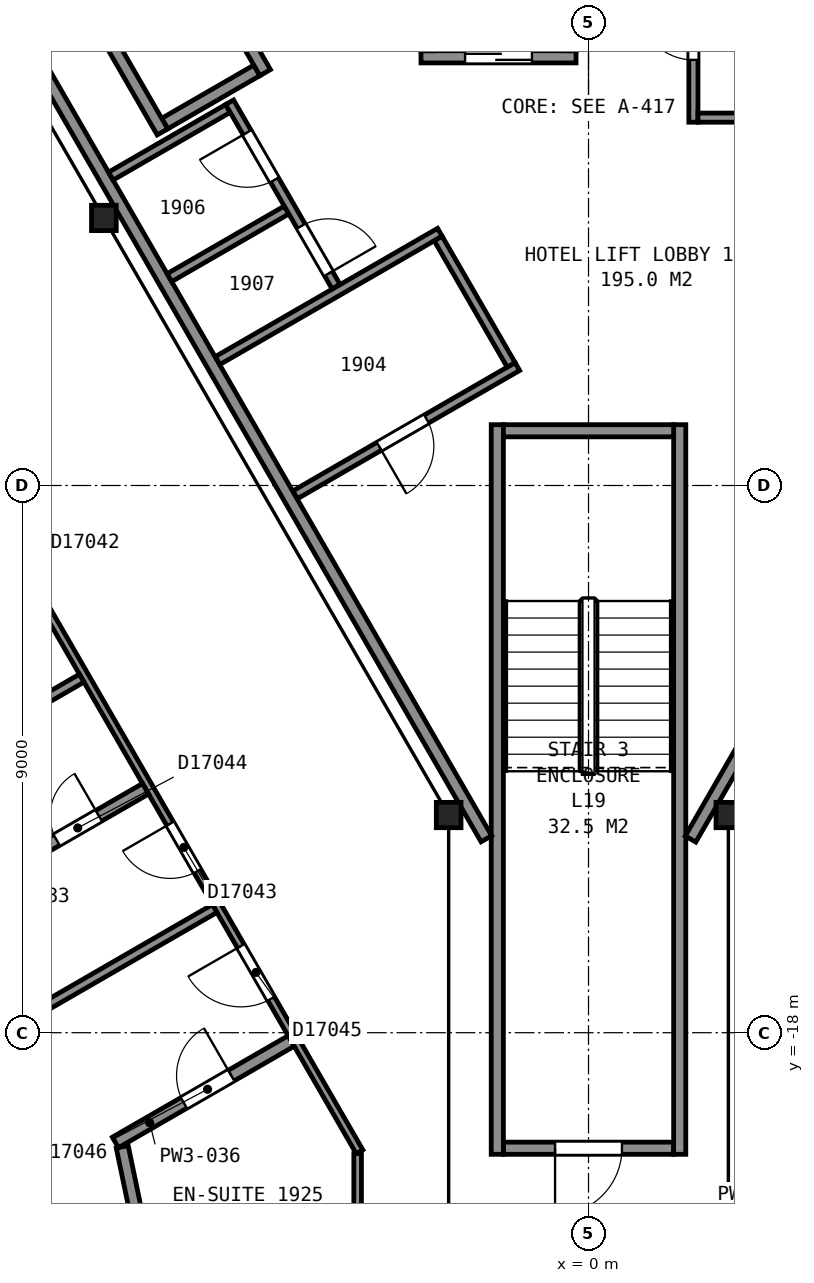
"""IFC4 building model, lengths in metres.
Left out: names, types, materials, properties, quantities, classifications, styles, units other than length and angle.
Written with IfcOpenShell. Run it as: python <this file> out.ifc"""

import sys

from ifc_helpers import new_model, si_unit, direction, frame, frame_2d, origin, origin_2d, place, context, subcontext, project, spatial, rectangle, i_section, extrude, element, fill, save


model = new_model("IFC4")
c1 = context("Model", 3, precision=1e-05, world=origin(), true_north=direction((0.0, 1.0)))
c2 = subcontext(c1, "Body", "Model", "MODEL_VIEW")
j1 = project(units=[si_unit("LENGTHUNIT", "METRE"), si_unit("PLANEANGLEUNIT", "RADIAN")], contexts=[c1])
p1 = place(None, origin())
s1 = spatial("IfcSite", under=j1, at=p1, CompositionType="ELEMENT")
p2 = place(p1, origin())
s2 = spatial("IfcBuilding", under=s1, at=p2, CompositionType="ELEMENT")
p3 = place(p2, frame((0.0, 0.0, 83.6)))
s3 = spatial("IfcBuildingStorey", under=s2, at=p3, CompositionType="ELEMENT", Elevation=83.6)
for number, where, z_axis, x_axis in (
    (1, (-7.97, -4.6, 0.0), (0.0, 0.0, 1.0), (1.0, 0.0, 0.0)),
    (2, (-2.3, -14.42, 0.0), (0.0, 0.0, 1.0), (1.0, 0.0, 0.0)),
    (3, (2.3, -14.42, 0.0), (0.0, 0.0, 1.0), (1.0, 0.0, 0.0)),
):
    element("IfcColumn", number, at=place(p3, frame(where, z_axis=z_axis, x_axis=x_axis)), inside=s3, PredefinedType="COLUMN", context=c2, shape_type="SweptSolid", body=[
        extrude(i_section(OverallWidth=0.406, OverallDepth=0.417, WebThickness=0.03, FlangeThickness=0.048, FilletRadius=0.015, at=origin_2d()), origin(), (0.0, 0.0, 1.0), 3.6),
    ])
p4 = place(p3, frame((-1.4, -19.9, 0.0), z_axis=(0.0, 0.0, 1.0), x_axis=(1.0, 0.0, 0.0)))
e4 = element("IfcWall", 4, at=p4, inside=s3, PredefinedType="PARTITIONING", context=c2, shape_type="SweptSolid", body=[
    extrude(rectangle(XDim=2.8, YDim=0.2, at=frame_2d((1.4, 0.0))), origin(), (0.0, 0.0, 1.0), 3.35),
])
p5 = place(p4, frame((0.85, 0.0, 0.0)))
e5 = element("IfcOpeningElement", 5, at=p5, cuts=e4, PredefinedType="OPENING", context=c2, shape_type="SweptSolid", body=[
    extrude(rectangle(XDim=1.1, YDim=2.1, at=frame_2d((0.55, 1.05))), frame((0.0, 0.11, 0.0), z_axis=(0.0, -1.0, 0.0), x_axis=(1.0, 0.0, 0.0)), (0.0, 0.0, 1.0), 0.22),
])
for number, where, z_axis, x_axis in (
    (6, (1.5, -8.0, 0.0), (0.0, 0.0, 1.0), (0.0, -1.0, 0.0)),
    (7, (-1.5, -8.0, 0.0), (0.0, 0.0, 1.0), (0.0, -1.0, 0.0)),
):
    element("IfcWall", number, at=place(p3, frame(where, z_axis=z_axis, x_axis=x_axis)), inside=s3, PredefinedType="PARTITIONING", context=c2, shape_type="SweptSolid", body=[
        extrude(rectangle(XDim=12.0, YDim=0.2, at=frame_2d((6.0, 0.0))), origin(), (0.0, 0.0, 1.0), 3.35),
    ])
p6 = place(p3, frame((-1.4, -8.1, 0.0), z_axis=(0.0, 0.0, 1.0), x_axis=(1.0, 0.0, 0.0)))
e8 = element("IfcWall", 8, at=p6, inside=s3, PredefinedType="PARTITIONING", context=c2, shape_type="SweptSolid", body=[
    extrude(rectangle(XDim=2.8, YDim=0.2, at=frame_2d((1.4, 0.0))), origin(), (0.0, 0.0, 1.0), 3.35),
])
p7 = place(p3, frame((-2.755, -1.95, 0.0), z_axis=(0.0, 0.0, 1.0), x_axis=(1.0, 0.0, 0.0)))
e9 = element("IfcWall", 9, at=p7, inside=s3, PredefinedType="PARTITIONING", context=c2, shape_type="SweptSolid", body=[
    extrude(rectangle(XDim=2.55, YDim=0.2, at=frame_2d((1.275, 0.0))), origin(), (0.0, 0.0, 1.0), 3.6),
])
p8 = place(p7, frame((0.725, 0.0, 0.0)))
e10 = element("IfcOpeningElement", 10, at=p8, cuts=e9, PredefinedType="OPENING", context=c2, shape_type="SweptSolid", body=[
    extrude(rectangle(XDim=1.1, YDim=2.1, at=frame_2d((0.55, 1.05))), frame((0.0, 0.11, 0.0), z_axis=(0.0, -1.0, 0.0), x_axis=(1.0, 0.0, 0.0)), (0.0, 0.0, 1.0), 0.22),
])
p9 = place(p3, frame((-6.97, -3.048, 0.0), z_axis=(0.0, 0.0, 1.0), x_axis=(0.866036909293, 0.499980071345, 0.0)))
e11 = element("IfcWall", 11, at=p9, inside=s3, PredefinedType="PARTITIONING", context=c2, shape_type="SweptSolid", body=[
    extrude(rectangle(XDim=1.75, YDim=0.2, at=frame_2d((0.875, 0.0))), origin(), (0.0, 0.0, 1.0), 3.6),
])
p10 = place(p3, frame((-5.318, -2.21, 0.0), z_axis=(0.0, 0.0, 1.0), x_axis=(-0.499938297808, 0.866061024631, 0.0)))
e12 = element("IfcWall", 12, at=p10, inside=s3, PredefinedType="PARTITIONING", context=c2, shape_type="SweptSolid", body=[
    extrude(rectangle(XDim=2.35, YDim=0.2, at=frame_2d((1.175, 0.0))), origin(), (0.0, 0.0, 1.0), 3.6),
])
p11 = place(p3, frame((-7.006, -3.185, 0.0), z_axis=(0.0, 0.0, 1.0), x_axis=(-0.499990435942, 0.866030925526, 0.0)))
e13 = element("IfcWall", 13, at=p11, inside=s3, PredefinedType="PARTITIONING", context=c2, shape_type="SweptSolid", body=[
    extrude(rectangle(XDim=2.55, YDim=0.2, at=frame_2d((1.275, 0.0))), origin(), (0.0, 0.0, 1.0), 3.6),
])
p12 = place(p3, frame((-13.664, 5.946, 0.0), z_axis=(0.0, 0.0, 1.0), x_axis=(0.499994327219, -0.866028678941, 0.0)))
e14 = element("IfcWall", 14, at=p12, inside=s3, PredefinedType="PARTITIONING", context=c2, shape_type="SweptSolid", body=[
    extrude(rectangle(XDim=23.968, YDim=0.2, at=frame_2d((11.984, 0.0))), origin(), (0.0, 0.0, 1.0), 3.35),
])
p13 = place(p3, frame((-7.856, -3.912, 0.0), z_axis=(0.0, 0.0, 1.0), x_axis=(0.865971748, 0.500092923031, 0.0)))
e15 = element("IfcWall", 15, at=p13, inside=s3, PredefinedType="PARTITIONING", context=c2, shape_type="SweptSolid", body=[
    extrude(rectangle(XDim=2.225, YDim=0.15, at=frame_2d((1.112, 0.0))), origin(), (0.0, 0.0, 1.0), 3.35),
])
p14 = place(p3, frame((-6.892, -5.582, 0.0), z_axis=(0.0, 0.0, 1.0), x_axis=(0.865944298464, 0.500140452231, 0.0)))
e16 = element("IfcWall", 16, at=p14, inside=s3, PredefinedType="PARTITIONING", context=c2, shape_type="SweptSolid", body=[
    extrude(rectangle(XDim=2.224, YDim=0.15, at=frame_2d((1.112, 0.0))), origin(), (0.0, 0.0, 1.0), 3.35),
])
p15 = place(p3, frame((-6.1, -6.946, 0.0), z_axis=(0.0, 0.0, 1.0), x_axis=(0.866038200431, 0.499977834903, 0.0)))
e17 = element("IfcWall", 17, at=p15, inside=s3, PredefinedType="PARTITIONING", context=c2, shape_type="SweptSolid", body=[
    extrude(rectangle(XDim=4.22, YDim=0.15, at=frame_2d((2.11, 0.0))), origin(), (0.0, 0.0, 1.0), 3.35),
])
p16 = place(p3, frame((-4.152, -5.729, 0.0), z_axis=(0.0, 0.0, 1.0), x_axis=(-0.500024287448, 0.866011380966, 0.0)))
e18 = element("IfcWall", 18, at=p16, inside=s3, PredefinedType="PARTITIONING", context=c2, shape_type="SweptSolid", body=[
    extrude(rectangle(XDim=3.501, YDim=0.15, at=frame_2d((1.75, 0.0))), origin(), (0.0, 0.0, 1.0), 3.35),
])
p17 = place(p16, frame((2.026, 0.0, 0.0)))
e19 = element("IfcOpeningElement", 19, at=p17, cuts=e18, PredefinedType="OPENING", context=c2, shape_type="SweptSolid", body=[
    extrude(rectangle(XDim=0.9, YDim=2.1, at=frame_2d((0.45, 1.05))), frame((0.0, 0.085, 0.0), z_axis=(0.0, -1.0, 0.0), x_axis=(1.0, 0.0, 0.0)), (0.0, 0.0, 1.0), 0.17),
])
p18 = place(p16, frame((0.248, 0.0, 0.0)))
e20 = element("IfcOpeningElement", 20, at=p18, cuts=e18, PredefinedType="OPENING", context=c2, shape_type="SweptSolid", body=[
    extrude(rectangle(XDim=0.9, YDim=2.1, at=frame_2d((0.45, 1.05))), frame((0.0, 0.085, 0.0), z_axis=(0.0, -1.0, 0.0), x_axis=(1.0, 0.0, 0.0)), (0.0, 0.0, 1.0), 0.17),
])
p19 = place(p3, frame((-4.825, -9.154, 0.0), z_axis=(0.0, 0.0, 1.0), x_axis=(0.866023738697, 0.500002884005, 0.0)))
e21 = element("IfcWall", 21, at=p19, inside=s3, PredefinedType="PARTITIONING", context=c2, shape_type="SweptSolid", body=[
    extrude(rectangle(XDim=4.22, YDim=0.15, at=frame_2d((2.11, 0.0))), origin(), (0.0, 0.0, 1.0), 3.35),
])
p20 = place(p19, frame((1.595, 0.0, 0.0)))
e22 = element("IfcOpeningElement", 22, at=p20, cuts=e21, PredefinedType="OPENING", context=c2, shape_type="SweptSolid", body=[
    extrude(rectangle(XDim=0.9, YDim=2.1, at=frame_2d((0.45, 1.05))), frame((0.0, 0.085, 0.0), z_axis=(0.0, -1.0, 0.0), x_axis=(1.0, 0.0, 0.0)), (0.0, 0.0, 1.0), 0.17),
])
p21 = place(p3, frame((-2.472, -4.938, 0.0), z_axis=(0.0, 0.0, 1.0), x_axis=(0.500045362686, -0.865999212041, 0.0)))
e23 = element("IfcWall", 23, at=p21, inside=s3, PredefinedType="PARTITIONING", context=c2, shape_type="SweptSolid", body=[
    extrude(rectangle(XDim=2.4, YDim=0.15, at=frame_2d((1.2, 0.0))), origin(), (0.0, 0.0, 1.0), 3.35),
])
p22 = place(p3, frame((1.677, -14.815, 0.0), z_axis=(0.0, 0.0, 1.0), x_axis=(0.49999445743, 0.866028603765, 0.0)))
e24 = element("IfcWall", 24, at=p22, inside=s3, PredefinedType="PARTITIONING", context=c2, shape_type="SweptSolid", body=[
    extrude(rectangle(XDim=5.905, YDim=0.2, at=frame_2d((2.952, 0.0))), origin(), (0.0, 0.0, 1.0), 3.35),
])
p23 = place(p22, frame((3.855, 0.0, 0.0)))
e25 = element("IfcOpeningElement", 25, at=p23, cuts=e24, PredefinedType="OPENING", context=c2, shape_type="SweptSolid", body=[
    extrude(rectangle(XDim=1.8, YDim=2.1, at=frame_2d((0.9, 1.05))), frame((0.0, 0.11, 0.0), z_axis=(0.0, -1.0, 0.0), x_axis=(1.0, 0.0, 0.0)), (0.0, 0.0, 1.0), 0.22),
])
p24 = place(p3, frame((1.725, -0.102, 0.0), z_axis=(0.0, 0.0, 1.0), x_axis=(0.0, -1.0, 0.0)))
e26 = element("IfcWall", 26, at=p24, inside=s3, PredefinedType="PARTITIONING", context=c2, shape_type="SweptSolid", body=[
    extrude(rectangle(XDim=2.923, YDim=0.15, at=frame_2d((1.461, 0.0))), origin(), (0.0, 0.0, 1.0), 3.35),
])
p25 = place(p24, frame((0.998, 0.0, 0.0)))
e27 = element("IfcOpeningElement", 27, at=p25, cuts=e26, PredefinedType="OPENING", context=c2, shape_type="SweptSolid", body=[
    extrude(rectangle(XDim=0.9, YDim=2.1, at=frame_2d((0.45, 1.05))), frame((0.0, 0.085, 0.0), z_axis=(0.0, -1.0, 0.0), x_axis=(1.0, 0.0, 0.0)), (0.0, 0.0, 1.0), 0.17),
])
p26 = place(p3, frame((1.8, -2.95, 0.0), z_axis=(0.0, 0.0, 1.0), x_axis=(1.0, 0.0, 0.0)))
e28 = element("IfcWall", 28, at=p26, inside=s3, PredefinedType="PARTITIONING", context=c2, shape_type="SweptSolid", body=[
    extrude(rectangle(XDim=2.4, YDim=0.15, at=frame_2d((1.2, 0.0))), origin(), (0.0, 0.0, 1.0), 3.35),
])
p27 = place(p3, frame((-3.766, -19.958, 0.0), z_axis=(0.0, 0.0, 1.0), x_axis=(-0.50002170027, 0.866012874765, 0.0)))
e29 = element("IfcWall", 29, at=p27, inside=s3, PredefinedType="PARTITIONING", context=c2, shape_type="SweptSolid", body=[
    extrude(rectangle(XDim=31.379, YDim=0.125, at=frame_2d((15.69, 0.0))), origin(), (0.0, 0.0, 1.0), 2.262),
])
p28 = place(p27, frame((25.28, 0.0, 0.0)))
e30 = element("IfcOpeningElement", 30, at=p28, cuts=e29, PredefinedType="OPENING", context=c2, shape_type="SweptSolid", body=[
    extrude(rectangle(XDim=1.5, YDim=2.1, at=frame_2d((0.75, 1.05))), frame((0.0, 0.073, 0.0), z_axis=(0.0, -1.0, 0.0), x_axis=(1.0, 0.0, 0.0)), (0.0, 0.0, 1.0), 0.145),
])
p29 = place(p27, frame((21.124, 0.0, 0.0)))
e31 = element("IfcOpeningElement", 31, at=p29, cuts=e29, PredefinedType="OPENING", context=c2, shape_type="SweptSolid", body=[
    extrude(rectangle(XDim=0.9, YDim=2.1, at=frame_2d((0.45, 1.05))), frame((0.0, 0.073, 0.0), z_axis=(0.0, -1.0, 0.0), x_axis=(1.0, 0.0, 0.0)), (0.0, 0.0, 1.0), 0.145),
])
p30 = place(p27, frame((14.349, 0.0, 0.0)))
e32 = element("IfcOpeningElement", 32, at=p30, cuts=e29, PredefinedType="OPENING", context=c2, shape_type="SweptSolid", body=[
    extrude(rectangle(XDim=0.9, YDim=2.1, at=frame_2d((0.45, 1.05))), frame((0.0, 0.073, 0.0), z_axis=(0.0, -1.0, 0.0), x_axis=(1.0, 0.0, 0.0)), (0.0, 0.0, 1.0), 0.145),
])
p31 = place(p27, frame((11.804, 0.0, 0.0)))
e33 = element("IfcOpeningElement", 33, at=p31, cuts=e29, PredefinedType="OPENING", context=c2, shape_type="SweptSolid", body=[
    extrude(rectangle(XDim=0.9, YDim=2.1, at=frame_2d((0.45, 1.05))), frame((0.0, 0.073, 0.0), z_axis=(0.0, -1.0, 0.0), x_axis=(1.0, 0.0, 0.0)), (0.0, 0.0, 1.0), 0.145),
])
p32 = place(p27, frame((5.33, 0.0, 0.0)))
e34 = element("IfcOpeningElement", 34, at=p32, cuts=e29, PredefinedType="OPENING", context=c2, shape_type="SweptSolid", body=[
    extrude(rectangle(XDim=0.9, YDim=2.1, at=frame_2d((0.45, 1.05))), frame((0.0, 0.073, 0.0), z_axis=(0.0, -1.0, 0.0), x_axis=(1.0, 0.0, 0.0)), (0.0, 0.0, 1.0), 0.145),
])
p33 = place(p27, frame((2.906, 0.0, 0.0)))
e35 = element("IfcOpeningElement", 35, at=p33, cuts=e29, PredefinedType="OPENING", context=c2, shape_type="SweptSolid", body=[
    extrude(rectangle(XDim=1.0, YDim=2.1, at=frame_2d((0.5, 1.05))), frame((0.0, 0.073, 0.0), z_axis=(0.0, -1.0, 0.0), x_axis=(1.0, 0.0, 0.0)), (0.0, 0.0, 1.0), 0.145),
])
for number, where, z_axis, x_axis in (
    (36, (-15.256, -16.165, 0.0), (0.0, 0.0, 1.0), (0.866, 0.5, 0.0)),
    (37, (-13.069, -19.953, 0.0), (0.0, 0.0, 1.0), (0.866, 0.5, 0.0)),
):
    element("IfcWall", number, at=place(p3, frame(where, z_axis=z_axis, x_axis=x_axis)), inside=s3, PredefinedType="PARTITIONING", context=c2, shape_type="SweptSolid", body=[
        extrude(rectangle(XDim=7.992, YDim=0.15, at=frame_2d((3.996, 0.0))), origin(), (0.0, 0.0, 1.0), 2.262),
    ])
p34 = place(p3, frame((-9.656, -15.357, 0.0), z_axis=(0.0, 0.0, 1.0), x_axis=(0.866005850709, 0.50003386539, 0.0)))
e38 = element("IfcWall", 38, at=p34, inside=s3, PredefinedType="PARTITIONING", context=c2, shape_type="SweptSolid", body=[
    extrude(rectangle(XDim=2.737, YDim=0.2, at=frame_2d((1.369, 0.0))), origin(), (0.0, 0.0, 1.0), 2.262),
])
p35 = place(p34, frame((1.05, 0.0, 0.0)))
e39 = element("IfcOpeningElement", 39, at=p35, cuts=e38, PredefinedType="OPENING", context=c2, shape_type="SweptSolid", body=[
    extrude(rectangle(XDim=0.8, YDim=2.1, at=frame_2d((0.4, 1.05))), frame((0.0, 0.11, 0.0), z_axis=(0.0, -1.0, 0.0), x_axis=(1.0, 0.0, 0.0)), (0.0, 0.0, 1.0), 0.22),
])
p36 = place(p3, frame((-7.668, -19.877, 0.0), z_axis=(0.0, 0.0, 1.0), x_axis=(0.204611748063, -0.978843211426, 0.0)))
e40 = element("IfcWall", 40, at=p36, inside=s3, PredefinedType="PARTITIONING", context=c2, shape_type="SweptSolid", body=[
    extrude(rectangle(XDim=2.921, YDim=0.2, at=frame_2d((1.46, 0.0))), origin(), (0.0, 0.0, 1.0), 2.262),
])
p37 = place(p3, frame((-4.89, -18.136, 0.0), z_axis=(0.0, 0.0, 1.0), x_axis=(-0.866033317326, -0.499986293093, 0.0)))
e41 = element("IfcWall", 41, at=p37, inside=s3, PredefinedType="PARTITIONING", context=c2, shape_type="SweptSolid", body=[
    extrude(rectangle(XDim=3.337, YDim=0.2, at=frame_2d((1.669, 0.0))), origin(), (0.0, 0.0, 1.0), 2.262),
])
p38 = place(p37, frame((1.138, 0.0, 0.0)))
e42 = element("IfcOpeningElement", 42, at=p38, cuts=e41, PredefinedType="OPENING", context=c2, shape_type="SweptSolid", body=[
    extrude(rectangle(XDim=0.9, YDim=2.1, at=frame_2d((0.45, 1.05))), frame((0.0, 0.11, 0.0), z_axis=(0.0, -1.0, 0.0), x_axis=(1.0, 0.0, 0.0)), (0.0, 0.0, 1.0), 0.22),
])
p39 = place(p3, frame((-3.797, -22.86, 0.0), z_axis=(0.0, 0.0, 1.0), x_axis=(0.0, 1.0, 0.0)))
e43 = element("IfcWall", 43, at=p39, inside=s3, PredefinedType="PARTITIONING", context=c2, shape_type="SweptSolid", body=[
    extrude(rectangle(XDim=2.871, YDim=0.125, at=frame_2d((1.435, 0.0))), origin(), (0.0, 0.0, 1.0), 2.262),
])
p40 = place(p5, origin())
e44 = element("IfcDoor", 44, at=p40, inside=s3, OperationType="SINGLE_SWING_LEFT", PredefinedType="DOOR", context=c2, shape_type="SweptSolid", body=[
    extrude(rectangle(XDim=1.1, YDim=2.1, at=frame_2d((0.55, 1.05))), frame((0.0, 0.025, 0.0), z_axis=(0.0, -1.0, 0.0), x_axis=(1.0, 0.0, 0.0)), (0.0, 0.0, 1.0), 0.05),
])
fill(e5, e44)
p41 = place(p8, origin())
e45 = element("IfcDoor", 45, at=p41, inside=s3, OperationType="SLIDING_TO_RIGHT", PredefinedType="DOOR", context=c2, shape_type="SweptSolid", body=[
    extrude(rectangle(XDim=1.1, YDim=2.1, at=frame_2d((0.55, 1.05))), frame((0.0, 0.025, 0.0), z_axis=(0.0, -1.0, 0.0), x_axis=(1.0, 0.0, 0.0)), (0.0, 0.0, 1.0), 0.05),
])
fill(e10, e45)
p42 = place(p17, origin())
e46 = element("IfcDoor", 46, at=p42, inside=s3, OperationType="SINGLE_SWING_RIGHT", PredefinedType="DOOR", context=c2, shape_type="SweptSolid", body=[
    extrude(rectangle(XDim=0.9, YDim=2.1, at=frame_2d((0.45, 1.05))), frame((0.0, 0.025, 0.0), z_axis=(0.0, -1.0, 0.0), x_axis=(1.0, 0.0, 0.0)), (0.0, 0.0, 1.0), 0.05),
])
fill(e19, e46)
p43 = place(p18, origin())
e47 = element("IfcDoor", 47, at=p43, inside=s3, OperationType="SINGLE_SWING_LEFT", PredefinedType="DOOR", context=c2, shape_type="SweptSolid", body=[
    extrude(rectangle(XDim=0.9, YDim=2.1, at=frame_2d((0.45, 1.05))), frame((0.0, 0.025, 0.0), z_axis=(0.0, -1.0, 0.0), x_axis=(1.0, 0.0, 0.0)), (0.0, 0.0, 1.0), 0.05),
])
fill(e20, e47)
p44 = place(p20, origin())
e48 = element("IfcDoor", 48, at=p44, inside=s3, OperationType="SINGLE_SWING_LEFT", PredefinedType="DOOR", context=c2, shape_type="SweptSolid", body=[
    extrude(rectangle(XDim=0.9, YDim=2.1, at=frame_2d((0.45, 1.05))), frame((0.0, 0.025, 0.0), z_axis=(0.0, -1.0, 0.0), x_axis=(1.0, 0.0, 0.0)), (0.0, 0.0, 1.0), 0.05),
])
fill(e22, e48)
p45 = place(p25, origin())
e49 = element("IfcDoor", 49, at=p45, inside=s3, OperationType="SINGLE_SWING_LEFT", PredefinedType="DOOR", context=c2, shape_type="SweptSolid", body=[
    extrude(rectangle(XDim=0.9, YDim=2.1, at=frame_2d((0.45, 1.05))), frame((0.0, 0.025, 0.0), z_axis=(0.0, -1.0, 0.0), x_axis=(1.0, 0.0, 0.0)), (0.0, 0.0, 1.0), 0.05),
])
fill(e27, e49)
p46 = place(p32, origin())
e50 = element("IfcDoor", 50, at=p46, inside=s3, OperationType="SINGLE_SWING_RIGHT", PredefinedType="DOOR", context=c2, shape_type="SweptSolid", body=[
    extrude(rectangle(XDim=0.9, YDim=2.1, at=frame_2d((0.45, 1.05))), frame((0.0, 0.025, 0.0), z_axis=(0.0, -1.0, 0.0), x_axis=(1.0, 0.0, 0.0)), (0.0, 0.0, 1.0), 0.05),
])
fill(e34, e50)
p47 = place(p33, origin())
e51 = element("IfcDoor", 51, at=p47, inside=s3, OperationType="SINGLE_SWING_RIGHT", PredefinedType="DOOR", context=c2, shape_type="SweptSolid", body=[
    extrude(rectangle(XDim=1.0, YDim=2.1, at=frame_2d((0.5, 1.05))), frame((0.0, 0.025, 0.0), z_axis=(0.0, -1.0, 0.0), x_axis=(1.0, 0.0, 0.0)), (0.0, 0.0, 1.0), 0.05),
])
fill(e35, e51)
p48 = place(p35, origin())
e52 = element("IfcDoor", 52, at=p48, inside=s3, OperationType="SINGLE_SWING_RIGHT", PredefinedType="DOOR", context=c2, shape_type="SweptSolid", body=[
    extrude(rectangle(XDim=0.8, YDim=2.1, at=frame_2d((0.4, 1.05))), frame((0.0, 0.025, 0.0), z_axis=(0.0, -1.0, 0.0), x_axis=(1.0, 0.0, 0.0)), (0.0, 0.0, 1.0), 0.05),
])
fill(e39, e52)
p49 = place(p38, origin())
e53 = element("IfcDoor", 53, at=p49, inside=s3, OperationType="SINGLE_SWING_LEFT", PredefinedType="DOOR", context=c2, shape_type="SweptSolid", body=[
    extrude(rectangle(XDim=0.9, YDim=2.1, at=frame_2d((0.45, 1.05))), frame((0.0, 0.025, 0.0), z_axis=(0.0, -1.0, 0.0), x_axis=(1.0, 0.0, 0.0)), (0.0, 0.0, 1.0), 0.05),
])
fill(e42, e53)
save(model, sys.argv[1])
